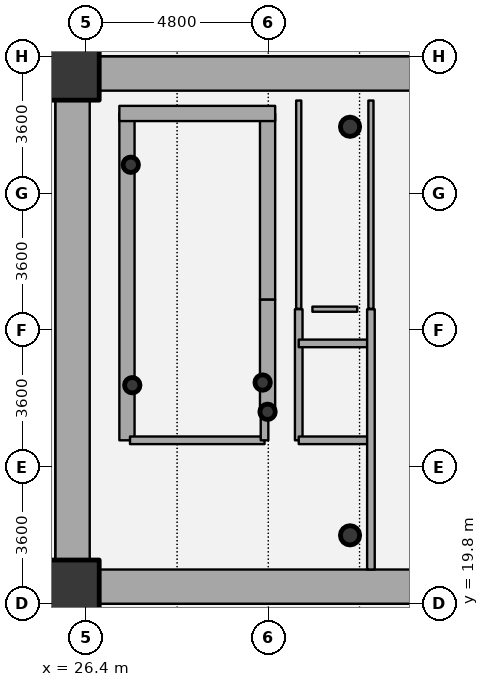
"""IFC4 building model, lengths in metres.
Left out: names, types, materials, properties, quantities, classifications, styles, units other than length and angle.
Written with IfcOpenShell. Run it as: python <this file> out.ifc"""

import sys

from ifc_helpers import new_model, si_unit, direction, frame, frame_2d, origin, origin_2d, place, context, subcontext, project, spatial, rectangle, hollow_circle, extrude, source, transform, mapped, element, fill, save


model = new_model("IFC4")
c1 = context("Model", 3, precision=1e-05, world=origin(), true_north=direction((0.0, 1.0)))
c2 = subcontext(c1, "Body", "Model", "MODEL_VIEW")
j1 = project(units=[si_unit("LENGTHUNIT", "METRE"), si_unit("PLANEANGLEUNIT", "RADIAN")], contexts=[c1])
p1 = place(None, origin())
s1 = spatial("IfcSite", under=j1, at=p1, CompositionType="ELEMENT")
p2 = place(p1, origin())
s2 = spatial("IfcBuilding", under=s1, at=p2, CompositionType="ELEMENT")
p3 = place(p2, frame((0.0, 0.0, -9.0)))
s3 = spatial("IfcBuildingStorey", under=s2, at=p3, CompositionType="ELEMENT", Elevation=-9.0)
for number, where, z_axis, x_axis in (
    (1, (26.05, 20.25, 0.0), (0.0, 0.0, 1.0), (1.0, 0.0, 0.0)),
    (2, (26.05, 33.75, 0.0), (0.0, 0.0, 1.0), (1.0, 0.0, 0.0)),
):
    element("IfcColumn", number, at=place(p3, frame(where, z_axis=z_axis, x_axis=x_axis)), inside=s3, PredefinedType="COLUMN", context=c2, shape_type="SweptSolid", body=[
        extrude(rectangle(XDim=1.4, YDim=1.4, at=origin_2d()), origin(), (0.0, 0.0, 1.0), 4.5),
    ])
for number, where, z_axis, x_axis in (
    (3, (33.35, 21.6, 0.0), (0.0, 0.0, 1.0), (1.0, 0.0, 0.0)),
    (4, (33.35, 32.35, 0.0), (0.0, 0.0, 1.0), (1.0, 0.0, 0.0)),
):
    element("IfcColumn", number, at=place(p3, frame(where, z_axis=z_axis, x_axis=x_axis)), inside=s3, PredefinedType="COLUMN", context=c2, shape_type="SweptSolid", body=[
        extrude(hollow_circle(Radius=0.254, WallThickness=0.02, at=origin_2d()), origin(), (0.0, 0.0, 1.0), 4.5),
    ])
p4 = place(p3, frame((27.48, 24.1, 0.0), z_axis=(0.0, 0.0, 1.0), x_axis=(0.0, 1.0, 0.0)))
e5 = element("IfcWall", 5, at=p4, inside=s3, PredefinedType="SHEAR", context=c2, shape_type="SweptSolid", body=[
    extrude(rectangle(XDim=8.6, YDim=0.4, at=frame_2d((4.3, 0.0))), origin(), (0.0, 0.0, 1.0), 4.5),
])
p5 = place(p3, frame((31.18, 27.8, 0.0), z_axis=(0.0, 0.0, 1.0), x_axis=(0.0, 1.0, 0.0)))
e6 = element("IfcWall", 6, at=p5, inside=s3, PredefinedType="SHEAR", context=c2, shape_type="SweptSolid", body=[
    extrude(rectangle(XDim=4.9, YDim=0.4, at=frame_2d((2.45, 0.0))), origin(), (0.0, 0.0, 1.0), 4.5),
])
p6 = place(p3, frame((27.28, 32.7, 0.0), z_axis=(0.0, 0.0, 1.0), x_axis=(1.0, 0.0, 0.0)))
e7 = element("IfcWall", 7, at=p6, inside=s3, PredefinedType="SHEAR", context=c2, shape_type="SweptSolid", body=[
    extrude(rectangle(XDim=4.1, YDim=0.4, at=frame_2d((2.05, 0.0))), origin(), (0.0, 0.0, 1.0), 4.5),
])
for number, where, z_axis, x_axis in (
    (8, (27.58, 31.35, 0.0), (0.0, 0.0, 1.0), (1.0, 0.0, 0.0)),
    (9, (31.05, 25.62, 0.0), (0.0, 0.0, 1.0), (1.0, 0.0, 0.0)),
    (10, (31.18, 24.85, 0.0), (0.0, 0.0, 1.0), (1.0, 0.0, 0.0)),
    (11, (27.62, 25.55, 0.0), (0.0, 0.0, 1.0), (1.0, 0.0, 0.0)),
):
    element("IfcColumn", number, at=place(p3, frame(where, z_axis=z_axis, x_axis=x_axis)), inside=s3, PredefinedType="COLUMN", context=c2, shape_type="SweptSolid", body=[
        extrude(hollow_circle(Radius=0.203, WallThickness=0.016, at=origin_2d()), origin(), (0.0, 0.0, 1.0), 4.5),
    ])
p7 = place(p3, frame((26.75, 33.75, 0.0), z_axis=(0.0, 0.0, 1.0), x_axis=(1.0, 0.0, 0.0)))
e12 = element("IfcWall", 12, at=p7, inside=s3, PredefinedType="SHEAR", context=c2, shape_type="SweptSolid", body=[
    extrude(rectangle(XDim=18.5, YDim=0.9, at=frame_2d((9.25, 0.0))), origin(), (0.0, 0.0, 1.0), 3.65),
])
p8 = place(p3, frame((45.25, 20.25, 0.0), z_axis=(0.0, 0.0, 1.0), x_axis=(-1.0, 0.0, 0.0)))
e13 = element("IfcWall", 13, at=p8, inside=s3, PredefinedType="SHEAR", context=c2, shape_type="SweptSolid", body=[
    extrude(rectangle(XDim=18.5, YDim=0.9, at=frame_2d((9.25, 0.0))), origin(), (0.0, 0.0, 1.0), 3.65),
])
p9 = place(p8, frame((10.0, 0.0, 0.0)))
e14 = element("IfcOpeningElement", 14, at=p9, cuts=e13, PredefinedType="OPENING", context=c2, shape_type="SweptSolid", body=[
    extrude(rectangle(XDim=1.15, YDim=2.15, at=origin_2d()), frame((0.575, 0.46, 1.075), z_axis=(0.0, -1.0, 0.0), x_axis=(1.0, 0.0, 0.0)), (0.0, 0.0, 1.0), 0.92),
])
p10 = place(p3, frame((26.05, 20.95, 0.0), z_axis=(0.0, 0.0, 1.0), x_axis=(0.0, 1.0, 0.0)))
e15 = element("IfcWall", 15, at=p10, inside=s3, PredefinedType="SHEAR", context=c2, shape_type="SweptSolid", body=[
    extrude(rectangle(XDim=12.1, YDim=0.9, at=frame_2d((6.05, 0.0))), origin(), (0.0, 0.0, 1.0), 3.65),
])
p11 = place(p10, frame((5.64, 0.0, 0.0)))
e16 = element("IfcOpeningElement", 16, at=p11, cuts=e15, PredefinedType="OPENING", context=c2, shape_type="SweptSolid", body=[
    extrude(rectangle(XDim=0.82, YDim=2.1, at=origin_2d()), frame((0.41, 0.46, 1.05), z_axis=(0.0, -1.0, 0.0), x_axis=(1.0, 0.0, 0.0)), (0.0, 0.0, 1.0), 0.92),
])
p12 = place(p3, frame((31.18, 24.85, 0.0), z_axis=(0.0, 0.0, 1.0), x_axis=(0.0, 1.0, 0.0)))
e17 = element("IfcWall", 17, at=p12, inside=s3, PredefinedType="SHEAR", context=c2, shape_type="SweptSolid", body=[
    extrude(rectangle(XDim=2.95, YDim=0.4, at=frame_2d((1.475, 0.0))), origin(), (0.0, 0.0, 1.0), 3.8),
])
p13 = place(p3, frame((27.56, 24.1, 0.0), z_axis=(0.0, 0.0, 1.0), x_axis=(1.0, 0.0, 0.0)))
e18 = element("IfcWall", 18, at=p13, inside=s3, PredefinedType="PARTITIONING", context=c2, shape_type="SweptSolid", body=[
    extrude(rectangle(XDim=3.54, YDim=0.2, at=frame_2d((1.77, 0.0))), origin(), (0.0, 0.0, 1.0), 4.2),
])
p14 = place(p13, frame((1.17, 0.0, 0.0)))
e19 = element("IfcOpeningElement", 19, at=p14, cuts=e18, PredefinedType="OPENING", context=c2, shape_type="SweptSolid", body=[
    extrude(rectangle(XDim=1.2, YDim=2.15, at=origin_2d()), frame((0.6, 0.11, 1.075), z_axis=(0.0, -1.0, 0.0), x_axis=(1.0, 0.0, 0.0)), (0.0, 0.0, 1.0), 0.22),
])
p15 = place(p3, frame((31.1, 24.1, 0.0), z_axis=(0.0, 0.0, 1.0), x_axis=(0.0, 1.0, 0.0)))
e20 = element("IfcWall", 20, at=p15, inside=s3, PredefinedType="PARTITIONING", context=c2, shape_type="SweptSolid", body=[
    extrude(rectangle(XDim=0.74, YDim=0.2, at=frame_2d((0.37, 0.0))), origin(), (0.0, 0.0, 1.0), 4.2),
])
p16 = place(p3, frame((32.0, 24.1, 0.0), z_axis=(0.0, 0.0, 1.0), x_axis=(0.0, 1.0, 0.0)))
e21 = element("IfcWall", 21, at=p16, inside=s3, PredefinedType="PARTITIONING", context=c2, shape_type="SweptSolid", body=[
    extrude(rectangle(XDim=3.45, YDim=0.2, at=frame_2d((1.725, 0.0))), origin(), (0.0, 0.0, 1.0), 4.2),
])
p17 = place(p3, frame((32.0, 24.1, 0.0), z_axis=(0.0, 0.0, 1.0), x_axis=(1.0, 0.0, 0.0)))
e22 = element("IfcWall", 22, at=p17, inside=s3, PredefinedType="PARTITIONING", context=c2, shape_type="SweptSolid", body=[
    extrude(rectangle(XDim=1.9, YDim=0.2, at=frame_2d((0.95, 0.0))), origin(), (0.0, 0.0, 1.0), 3.785),
])
p18 = place(p17, frame((0.375, 0.0, 0.0)))
e23 = element("IfcOpeningElement", 23, at=p18, cuts=e22, PredefinedType="OPENING", context=c2, shape_type="SweptSolid", body=[
    extrude(rectangle(XDim=1.15, YDim=2.15, at=origin_2d()), frame((0.575, 0.11, 1.075), z_axis=(0.0, -1.0, 0.0), x_axis=(1.0, 0.0, 0.0)), (0.0, 0.0, 1.0), 0.22),
])
p19 = place(p3, frame((32.0, 26.65, 0.0), z_axis=(0.0, 0.0, 1.0), x_axis=(1.0, 0.0, 0.0)))
e24 = element("IfcWall", 24, at=p19, inside=s3, PredefinedType="PARTITIONING", context=c2, shape_type="SweptSolid", body=[
    extrude(rectangle(XDim=1.9, YDim=0.2, at=frame_2d((0.95, 0.0))), origin(), (0.0, 0.0, 1.0), 3.785),
])
p20 = place(p3, frame((33.9, 20.7, 0.0), z_axis=(0.0, 0.0, 1.0), x_axis=(0.0, 1.0, 0.0)))
e25 = element("IfcWall", 25, at=p20, inside=s3, PredefinedType="PARTITIONING", context=c2, shape_type="SweptSolid", body=[
    extrude(rectangle(XDim=6.85, YDim=0.2, at=frame_2d((3.425, 0.0))), origin(), (0.0, 0.0, 1.0), 3.785),
])
p21 = place(p3, frame((32.36, 27.55, 0.0), z_axis=(0.0, 0.0, 1.0), x_axis=(1.0, 0.0, 0.0)))
e26 = element("IfcWall", 26, at=p21, inside=s3, PredefinedType="PARTITIONING", context=c2, shape_type="SweptSolid", body=[
    extrude(rectangle(XDim=1.18, YDim=0.135, at=frame_2d((0.59, 0.0))), origin(), (0.0, 0.0, 1.0), 3.785),
])
p22 = place(p3, frame((32.0, 33.04, 0.0), z_axis=(0.0, 0.0, 1.0), x_axis=(0.0, -1.0, 0.0)))
e27 = element("IfcWall", 27, at=p22, inside=s3, PredefinedType="PARTITIONING", context=c2, shape_type="SweptSolid", body=[
    extrude(rectangle(XDim=5.48, YDim=0.135, at=frame_2d((2.74, 0.0))), origin(), (0.0, 0.0, 1.0), 3.735),
])
p23 = place(p3, frame((33.9, 27.56, 0.0), z_axis=(0.0, 0.0, 1.0), x_axis=(0.0, 1.0, 0.0)))
e28 = element("IfcWall", 28, at=p23, inside=s3, PredefinedType="PARTITIONING", context=c2, shape_type="SweptSolid", body=[
    extrude(rectangle(XDim=5.48, YDim=0.135, at=frame_2d((2.74, 0.0))), origin(), (0.0, 0.0, 1.0), 3.785),
])
m1 = source(origin(), c2, "Body", "SweptSolid", [
    extrude(rectangle(XDim=0.82, YDim=2.1, at=origin_2d()), frame((0.41, 0.025, 1.05), z_axis=(0.0, -1.0, 0.0), x_axis=(1.0, 0.0, 0.0)), (0.0, 0.0, 1.0), 0.05),
])
p24 = place(p11, origin())
e29 = element("IfcDoor", 29, at=p24, inside=s3, OperationType="SINGLE_SWING_RIGHT", PredefinedType="DOOR", context=c2, shape_type="MappedRepresentation", body=[
    mapped(m1, transform((0.0, 0.0, 0.0), x_axis=(1.0, 0.0, 0.0), y_axis=(0.0, 1.0, 0.0), z_axis=(0.0, 0.0, 1.0), scale=1.0)),
])
fill(e16, e29)
m2 = source(origin(), c2, "Body", "SweptSolid", [
    extrude(rectangle(XDim=1.15, YDim=2.15, at=origin_2d()), frame((0.575, 0.025, 1.075), z_axis=(0.0, -1.0, 0.0), x_axis=(1.0, 0.0, 0.0)), (0.0, 0.0, 1.0), 0.05),
])
p25 = place(p9, origin())
e30 = element("IfcDoor", 30, at=p25, inside=s3, OperationType="SINGLE_SWING_RIGHT", PredefinedType="DOOR", context=c2, shape_type="MappedRepresentation", body=[
    mapped(m2, transform((0.0, 0.0, 0.0), x_axis=(1.0, 0.0, 0.0), y_axis=(0.0, 1.0, 0.0), z_axis=(0.0, 0.0, 1.0), scale=1.0)),
])
fill(e14, e30)
m3 = source(origin(), c2, "Body", "SweptSolid", [
    extrude(rectangle(XDim=1.2, YDim=2.15, at=origin_2d()), frame((0.6, 0.025, 1.075), z_axis=(0.0, -1.0, 0.0), x_axis=(1.0, 0.0, 0.0)), (0.0, 0.0, 1.0), 0.05),
])
p26 = place(p14, origin())
e31 = element("IfcDoor", 31, at=p26, inside=s3, OperationType="SINGLE_SWING_LEFT", PredefinedType="DOOR", context=c2, shape_type="MappedRepresentation", body=[
    mapped(m3, transform((0.0, 0.0, 0.0), x_axis=(1.0, 0.0, 0.0), y_axis=(0.0, 1.0, 0.0), z_axis=(0.0, 0.0, 1.0), scale=1.0)),
])
fill(e19, e31)
m4 = source(origin(), c2, "Body", "SweptSolid", [
    extrude(rectangle(XDim=1.15, YDim=2.15, at=origin_2d()), frame((0.575, 0.025, 1.075), z_axis=(0.0, -1.0, 0.0), x_axis=(1.0, 0.0, 0.0)), (0.0, 0.0, 1.0), 0.05),
])
p27 = place(p18, origin())
e32 = element("IfcDoor", 32, at=p27, inside=s3, OperationType="DOUBLE_DOOR_SLIDING", PredefinedType="USERDEFINED", context=c2, shape_type="MappedRepresentation", body=[
    mapped(m4, transform((0.0, 0.0, 0.0), x_axis=(1.0, 0.0, 0.0), y_axis=(0.0, 1.0, 0.0), z_axis=(0.0, 0.0, 1.0), scale=1.0)),
])
fill(e23, e32)
save(model, sys.argv[1])
